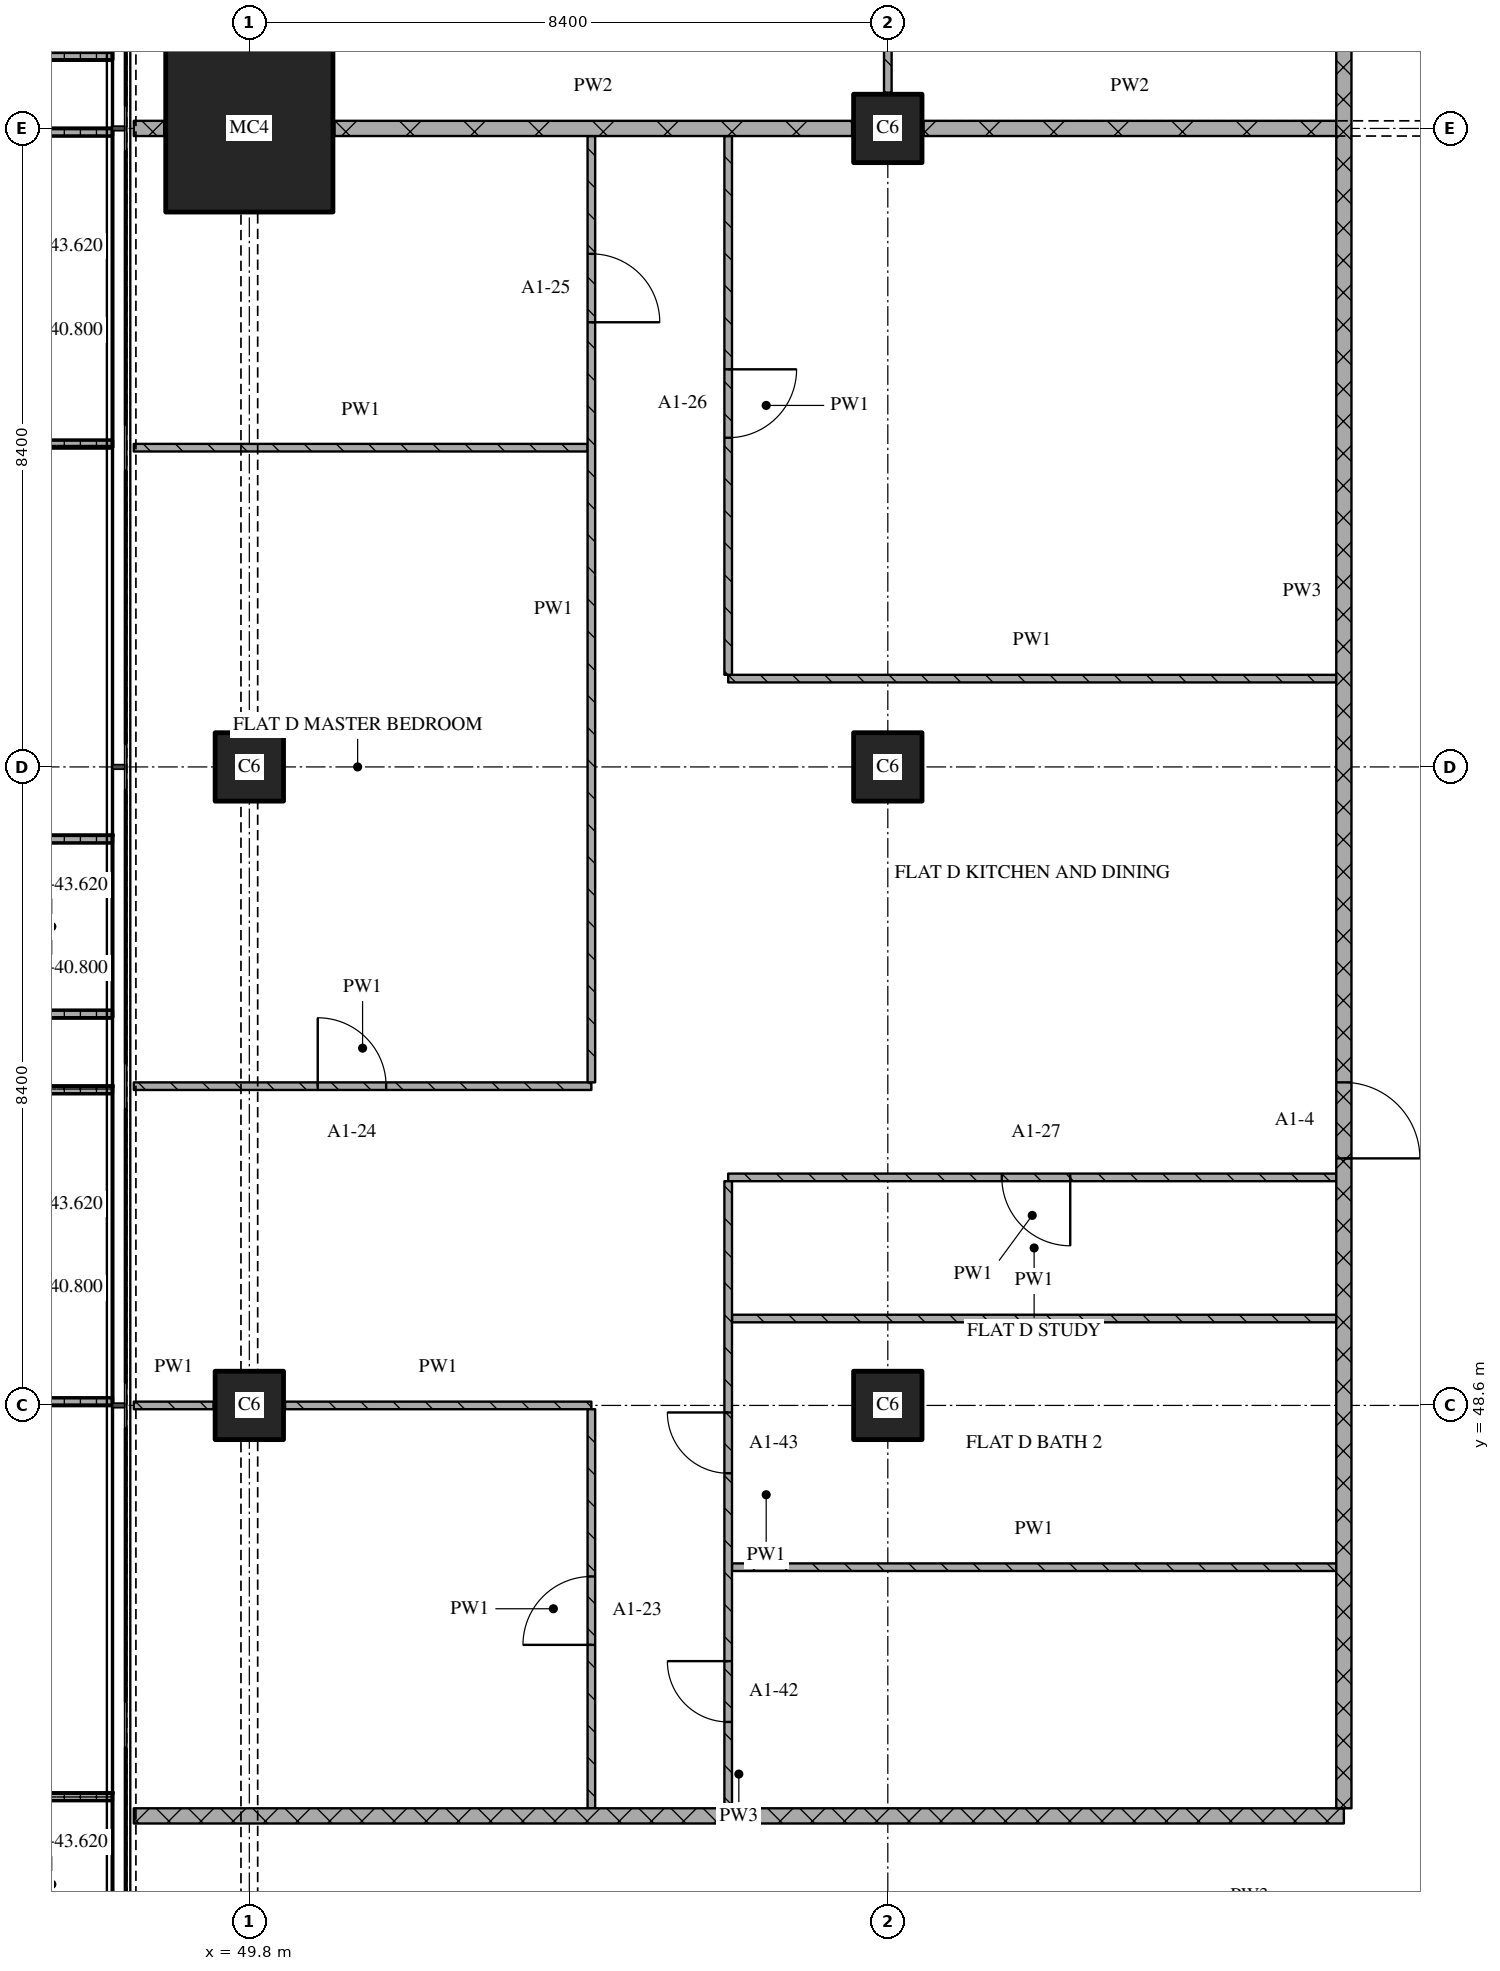
"""IFC4 building model, lengths in metres.
Left out: names, types, materials, properties, quantities, classifications, styles, units other than length and angle.
Written with IfcOpenShell. Run it as: python <this file> out.ifc"""

import sys

from ifc_helpers import new_model, si_unit, direction, frame, frame_2d, origin, origin_2d, place, context, subcontext, project, spatial, polyline, rectangle, outline, extrude, element, fill, save


model = new_model("IFC4")
c1 = context("Model", 3, precision=1e-05, world=origin(), true_north=direction((0.0, 1.0)))
c2 = subcontext(c1, "Body", "Model", "MODEL_VIEW")
j1 = project(units=[si_unit("LENGTHUNIT", "METRE"), si_unit("PLANEANGLEUNIT", "RADIAN")], contexts=[c1])
p1 = place(None, origin())
s1 = spatial("IfcSite", under=j1, at=p1, CompositionType="ELEMENT")
p2 = place(p1, origin())
s2 = spatial("IfcBuilding", under=s1, at=p2, CompositionType="ELEMENT")
p3 = place(p2, frame((0.0, 0.0, 40.8)))
s3 = spatial("IfcBuildingStorey", under=s2, at=p3, CompositionType="ELEMENT", Elevation=40.8)
for number, where, z_axis, x_axis in (
    (1, (49.8, 48.6, 0.0), (0.0, 0.0, 1.0), (1.0, 0.0, 0.0)),
    (2, (49.8, 57.0, 0.0), (0.0, 0.0, 1.0), (1.0, 0.0, 0.0)),
):
    element("IfcColumn", number, at=place(p3, frame(where, z_axis=z_axis, x_axis=x_axis)), inside=s3, PredefinedType="COLUMN", context=c2, shape_type="SweptSolid", body=[
        extrude(rectangle(XDim=0.9, YDim=0.9, at=origin_2d()), origin(), (0.0, 0.0, 1.0), 3.6),
    ])
p4 = place(p3, frame((49.8, 65.4, 0.0), z_axis=(0.0, 0.0, 1.0), x_axis=(1.0, 0.0, 0.0)))
e3 = element("IfcColumn", 3, at=p4, inside=s3, PredefinedType="COLUMN", context=c2, shape_type="SweptSolid", body=[
    extrude(rectangle(XDim=2.2, YDim=2.2, at=origin_2d()), origin(), (0.0, 0.0, 1.0), 3.6),
])
for number, where, z_axis, x_axis in (
    (4, (58.2, 48.6, 0.0), (0.0, 0.0, 1.0), (1.0, 0.0, 0.0)),
    (5, (58.2, 57.0, 0.0), (0.0, 0.0, 1.0), (1.0, 0.0, 0.0)),
    (6, (58.2, 65.4, 0.0), (0.0, 0.0, 1.0), (1.0, 0.0, 0.0)),
):
    element("IfcColumn", number, at=place(p3, frame(where, z_axis=z_axis, x_axis=x_axis)), inside=s3, PredefinedType="COLUMN", context=c2, shape_type="SweptSolid", body=[
        extrude(rectangle(XDim=0.9, YDim=0.9, at=origin_2d()), origin(), (0.0, 0.0, 1.0), 3.6),
    ])
p5 = place(p3, origin())
e7 = element("IfcWall", 7, at=p5, inside=s3, PredefinedType="SOLIDWALL", context=c2, shape_type="SweptSolid", body=[
    extrude(outline(polyline([(48.0, 68.7), (48.0, 68.6), (46.5, 68.6), (46.5, 66.4), (48.0, 66.4), (48.0, 66.3), (46.4, 66.3), (46.4, 68.7), (48.0, 68.7)])), origin(), (0.0, 0.0, 1.0), 1.0),
])
p6 = place(p3, origin())
e8 = element("IfcWall", 8, at=p6, inside=s3, PredefinedType="SOLIDWALL", context=c2, shape_type="SweptSolid", body=[
    extrude(outline(polyline([(48.0, 65.4), (48.0, 65.3), (46.367, 65.3), (46.367, 61.3), (48.0, 61.3), (48.0, 61.2), (46.267, 61.2), (46.267, 65.4), (48.0, 65.4)])), origin(), (0.0, 0.0, 1.0), 1.0),
])
p7 = place(p3, origin())
e9 = element("IfcWall", 9, at=p7, inside=s3, PredefinedType="SOLIDWALL", context=c2, shape_type="SweptSolid", body=[
    extrude(outline(polyline([(48.0, 56.1), (48.0, 56.0), (46.5, 56.0), (46.5, 53.8), (48.0, 53.8), (48.0, 53.7), (46.4, 53.7), (46.4, 56.1), (48.0, 56.1)])), origin(), (0.0, 0.0, 1.0), 1.0),
])
p8 = place(p3, origin())
e10 = element("IfcWall", 10, at=p8, inside=s3, PredefinedType="SOLIDWALL", context=c2, shape_type="SweptSolid", body=[
    extrude(outline(polyline([(48.0, 52.8), (48.0, 52.7), (46.367, 52.7), (46.367, 48.7), (48.0, 48.7), (48.0, 48.6), (46.267, 48.6), (46.267, 52.8), (48.0, 52.8)])), origin(), (0.0, 0.0, 1.0), 1.0),
])
p9 = place(p3, origin())
e11 = element("IfcWall", 11, at=p9, inside=s3, PredefinedType="SOLIDWALL", context=c2, shape_type="SweptSolid", body=[
    extrude(outline(polyline([(48.0, 43.5), (48.0, 43.4), (46.5, 43.4), (46.5, 41.2), (48.0, 41.2), (48.0, 41.1), (46.4, 41.1), (46.4, 43.5), (48.0, 43.5)])), origin(), (0.0, 0.0, 1.0), 1.0),
])
p10 = place(p3, frame((48.28, 43.2, 0.0), z_axis=(0.0, 0.0, 1.0), x_axis=(1.0, 0.0, 0.0)))
e12 = element("IfcWall", 12, at=p10, inside=s3, PredefinedType="PARTITIONING", context=c2, shape_type="SweptSolid", body=[
    extrude(rectangle(XDim=15.92, YDim=0.2, at=frame_2d((7.96, 0.0))), origin(), (0.0, 0.0, 1.0), 3.32),
])
p11 = place(p3, frame((56.15, 46.472, 0.0), z_axis=(0.0, 0.0, 1.0), x_axis=(1.0, 0.0, 0.0)))
e13 = element("IfcWall", 13, at=p11, inside=s3, PredefinedType="PARTITIONING", context=c2, shape_type="SweptSolid", body=[
    extrude(rectangle(XDim=7.95, YDim=0.1, at=frame_2d((3.975, 0.0))), origin(), (0.0, 0.0, 1.0), 3.32),
])
p12 = place(p3, frame((48.28, 48.6, 0.0), z_axis=(0.0, 0.0, 1.0), x_axis=(1.0, 0.0, 0.0)))
e14 = element("IfcWall", 14, at=p12, inside=s3, PredefinedType="PARTITIONING", context=c2, shape_type="SweptSolid", body=[
    extrude(rectangle(XDim=1.05, YDim=0.1, at=frame_2d((0.525, 0.0))), origin(), (0.0, 0.0, 1.0), 3.32),
])
p13 = place(p3, frame((50.27, 48.6, 0.0), z_axis=(0.0, 0.0, 1.0), x_axis=(1.0, 0.0, 0.0)))
e15 = element("IfcWall", 15, at=p13, inside=s3, PredefinedType="PARTITIONING", context=c2, shape_type="SweptSolid", body=[
    extrude(rectangle(XDim=4.03, YDim=0.1, at=frame_2d((2.015, 0.0))), origin(), (0.0, 0.0, 1.0), 3.32),
])
p14 = place(p3, frame((56.15, 49.743, 0.0), z_axis=(0.0, 0.0, 1.0), x_axis=(1.0, 0.0, 0.0)))
e16 = element("IfcWall", 16, at=p14, inside=s3, PredefinedType="PARTITIONING", context=c2, shape_type="SweptSolid", body=[
    extrude(rectangle(XDim=7.95, YDim=0.1, at=frame_2d((3.975, 0.0))), origin(), (0.0, 0.0, 1.0), 3.32),
])
p15 = place(p3, frame((64.1, 51.6, 0.0), z_axis=(0.0, 0.0, 1.0), x_axis=(-1.0, 0.0, 0.0)))
e17 = element("IfcWall", 17, at=p15, inside=s3, PredefinedType="PARTITIONING", context=c2, shape_type="SweptSolid", body=[
    extrude(rectangle(XDim=8.0, YDim=0.1, at=frame_2d((4.0, 0.0))), origin(), (0.0, 0.0, 1.0), 3.32),
])
p16 = place(p15, frame((3.5, 0.0, 0.0)))
e18 = element("IfcOpeningElement", 18, at=p16, cuts=e17, PredefinedType="OPENING", context=c2, shape_type="SweptSolid", body=[
    extrude(rectangle(XDim=0.9, YDim=2.1, at=frame_2d((0.45, 1.05))), frame((0.0, 0.06, 0.0), z_axis=(0.0, -1.0, 0.0), x_axis=(1.0, 0.0, 0.0)), (0.0, 0.0, 1.0), 0.12),
])
p17 = place(p3, frame((48.28, 52.8, 0.0), z_axis=(0.0, 0.0, 1.0), x_axis=(1.0, 0.0, 0.0)))
e19 = element("IfcWall", 19, at=p17, inside=s3, PredefinedType="PARTITIONING", context=c2, shape_type="SweptSolid", body=[
    extrude(rectangle(XDim=6.02, YDim=0.1, at=frame_2d((3.01, 0.0))), origin(), (0.0, 0.0, 1.0), 3.32),
])
p18 = place(p17, frame((2.42, 0.0, 0.0)))
e20 = element("IfcOpeningElement", 20, at=p18, cuts=e19, PredefinedType="OPENING", context=c2, shape_type="SweptSolid", body=[
    extrude(rectangle(XDim=0.9, YDim=2.1, at=frame_2d((0.45, 1.05))), frame((0.0, 0.06, 0.0), z_axis=(0.0, -1.0, 0.0), x_axis=(1.0, 0.0, 0.0)), (0.0, 0.0, 1.0), 0.12),
])
p19 = place(p3, frame((56.1, 58.162, 0.0), z_axis=(0.0, 0.0, 1.0), x_axis=(1.0, 0.0, 0.0)))
e21 = element("IfcWall", 21, at=p19, inside=s3, PredefinedType="PARTITIONING", context=c2, shape_type="SweptSolid", body=[
    extrude(rectangle(XDim=8.0, YDim=0.1, at=frame_2d((4.0, 0.0))), origin(), (0.0, 0.0, 1.0), 3.32),
])
p20 = place(p3, frame((48.28, 61.2, 0.0), z_axis=(0.0, 0.0, 1.0), x_axis=(1.0, 0.0, 0.0)))
e22 = element("IfcWall", 22, at=p20, inside=s3, PredefinedType="PARTITIONING", context=c2, shape_type="SweptSolid", body=[
    extrude(rectangle(XDim=5.97, YDim=0.1, at=frame_2d((2.985, 0.0))), origin(), (0.0, 0.0, 1.0), 3.32),
])
p21 = place(p3, frame((48.28, 65.4, 0.0), z_axis=(0.0, 0.0, 1.0), x_axis=(1.0, 0.0, 0.0)))
e23 = element("IfcWall", 23, at=p21, inside=s3, PredefinedType="PARTITIONING", context=c2, shape_type="SweptSolid", body=[
    extrude(rectangle(XDim=0.4, YDim=0.2, at=frame_2d((0.2, 0.0))), origin(), (0.0, 0.0, 1.0), 3.32),
])
p22 = place(p3, frame((50.92, 65.4, 0.0), z_axis=(0.0, 0.0, 1.0), x_axis=(1.0, 0.0, 0.0)))
e24 = element("IfcWall", 24, at=p22, inside=s3, PredefinedType="PARTITIONING", context=c2, shape_type="SweptSolid", body=[
    extrude(rectangle(XDim=6.81, YDim=0.2, at=frame_2d((3.405, 0.0))), origin(), (0.0, 0.0, 1.0), 3.32),
])
p23 = place(p3, frame((58.67, 65.4, 0.0), z_axis=(0.0, 0.0, 1.0), x_axis=(1.0, 0.0, 0.0)))
e25 = element("IfcWall", 25, at=p23, inside=s3, PredefinedType="PARTITIONING", context=c2, shape_type="SweptSolid", body=[
    extrude(rectangle(XDim=5.43, YDim=0.2, at=frame_2d((2.715, 0.0))), origin(), (0.0, 0.0, 1.0), 2.82),
])
p24 = place(p3, frame((54.3, 43.3, 0.0), z_axis=(0.0, 0.0, 1.0), x_axis=(0.0, 1.0, 0.0)))
e26 = element("IfcWall", 26, at=p24, inside=s3, PredefinedType="PARTITIONING", context=c2, shape_type="SweptSolid", body=[
    extrude(rectangle(XDim=5.25, YDim=0.1, at=frame_2d((2.625, 0.0))), origin(), (0.0, 0.0, 1.0), 3.32),
])
p25 = place(p24, frame((2.15, 0.0, 0.0)))
e27 = element("IfcOpeningElement", 27, at=p25, cuts=e26, PredefinedType="OPENING", context=c2, shape_type="SweptSolid", body=[
    extrude(rectangle(XDim=0.9, YDim=2.1, at=frame_2d((0.45, 1.05))), frame((0.0, 0.06, 0.0), z_axis=(0.0, -1.0, 0.0), x_axis=(1.0, 0.0, 0.0)), (0.0, 0.0, 1.0), 0.12),
])
p26 = place(p3, frame((54.3, 52.85, 0.0), z_axis=(0.0, 0.0, 1.0), x_axis=(0.0, 1.0, 0.0)))
e28 = element("IfcWall", 28, at=p26, inside=s3, PredefinedType="PARTITIONING", context=c2, shape_type="SweptSolid", body=[
    extrude(rectangle(XDim=12.45, YDim=0.1, at=frame_2d((6.225, 0.0))), origin(), (0.0, 0.0, 1.0), 3.32),
])
p27 = place(p26, frame((10.0, 0.0, 0.0)))
e29 = element("IfcOpeningElement", 29, at=p27, cuts=e28, PredefinedType="OPENING", context=c2, shape_type="SweptSolid", body=[
    extrude(rectangle(XDim=0.9, YDim=2.1, at=frame_2d((0.45, 1.05))), frame((0.0, 0.06, 0.0), z_axis=(0.0, -1.0, 0.0), x_axis=(1.0, 0.0, 0.0)), (0.0, 0.0, 1.0), 0.12),
])
p28 = place(p3, frame((56.1, 51.55, 0.0), z_axis=(0.0, 0.0, 1.0), x_axis=(0.0, -1.0, 0.0)))
e30 = element("IfcWall", 30, at=p28, inside=s3, PredefinedType="PARTITIONING", context=c2, shape_type="SweptSolid", body=[
    extrude(rectangle(XDim=8.25, YDim=0.1, at=frame_2d((4.125, 0.0))), origin(), (0.0, 0.0, 1.0), 3.32),
])
p29 = place(p28, frame((3.042, 0.0, 0.0)))
e31 = element("IfcOpeningElement", 31, at=p29, cuts=e30, PredefinedType="OPENING", context=c2, shape_type="SweptSolid", body=[
    extrude(rectangle(XDim=0.8, YDim=2.1, at=frame_2d((0.4, 1.05))), frame((0.0, 0.06, 0.0), z_axis=(0.0, -1.0, 0.0), x_axis=(1.0, 0.0, 0.0)), (0.0, 0.0, 1.0), 0.12),
])
p30 = place(p28, frame((6.314, 0.0, 0.0)))
e32 = element("IfcOpeningElement", 32, at=p30, cuts=e30, PredefinedType="OPENING", context=c2, shape_type="SweptSolid", body=[
    extrude(rectangle(XDim=0.8, YDim=2.1, at=frame_2d((0.4, 1.05))), frame((0.0, 0.06, 0.0), z_axis=(0.0, -1.0, 0.0), x_axis=(1.0, 0.0, 0.0)), (0.0, 0.0, 1.0), 0.12),
])
p31 = place(p3, frame((56.1, 65.3, 0.0), z_axis=(0.0, 0.0, 1.0), x_axis=(0.0, -1.0, 0.0)))
e33 = element("IfcWall", 33, at=p31, inside=s3, PredefinedType="PARTITIONING", context=c2, shape_type="SweptSolid", body=[
    extrude(rectangle(XDim=7.088, YDim=0.1, at=frame_2d((3.544, 0.0))), origin(), (0.0, 0.0, 1.0), 3.32),
])
p32 = place(p31, frame((3.069, 0.0, 0.0)))
e34 = element("IfcOpeningElement", 34, at=p32, cuts=e33, PredefinedType="OPENING", context=c2, shape_type="SweptSolid", body=[
    extrude(rectangle(XDim=0.9, YDim=2.1, at=frame_2d((0.45, 1.05))), frame((0.0, 0.06, 0.0), z_axis=(0.0, -1.0, 0.0), x_axis=(1.0, 0.0, 0.0)), (0.0, 0.0, 1.0), 0.12),
])
p33 = place(p3, frame((58.2, 68.95, 0.0), z_axis=(0.0, 0.0, 1.0), x_axis=(0.0, -1.0, 0.0)))
e35 = element("IfcWall", 35, at=p33, inside=s3, PredefinedType="PARTITIONING", context=c2, shape_type="SweptSolid", body=[
    extrude(rectangle(XDim=3.08, YDim=0.1, at=frame_2d((1.54, 0.0))), origin(), (0.0, 0.0, 1.0), 3.32),
])
p34 = place(p3, frame((64.2, 43.3, 0.0), z_axis=(0.0, 0.0, 1.0), x_axis=(0.0, 1.0, 0.0)))
e36 = element("IfcWall", 36, at=p34, inside=s3, PredefinedType="PARTITIONING", context=c2, shape_type="SweptSolid", body=[
    extrude(rectangle(XDim=32.02, YDim=0.2, at=frame_2d((16.01, 0.0))), origin(), (0.0, 0.0, 1.0), 3.32),
])
p35 = place(p34, frame((8.55, 0.0, 0.0)))
e37 = element("IfcOpeningElement", 37, at=p35, cuts=e36, PredefinedType="OPENING", context=c2, shape_type="SweptSolid", body=[
    extrude(rectangle(XDim=1.0, YDim=2.1, at=frame_2d((0.5, 1.05))), frame((0.0, 0.11, 0.0), z_axis=(0.0, -1.0, 0.0), x_axis=(1.0, 0.0, 0.0)), (0.0, 0.0, 1.0), 0.22),
])
p36 = place(p34, frame((25.95, 0.0, 0.0)))
e38 = element("IfcOpeningElement", 38, at=p36, cuts=e36, PredefinedType="OPENING", context=c2, shape_type="SweptSolid", body=[
    extrude(rectangle(XDim=1.0, YDim=2.1, at=frame_2d((0.5, 1.05))), frame((0.0, 0.11, 0.0), z_axis=(0.0, -1.0, 0.0), x_axis=(1.0, 0.0, 0.0)), (0.0, 0.0, 1.0), 0.22),
])
p37 = place(p16, origin())
e39 = element("IfcDoor", 39, at=p37, inside=s3, OperationType="SINGLE_SWING_LEFT", PredefinedType="DOOR", context=c2, shape_type="SweptSolid", body=[
    extrude(rectangle(XDim=0.9, YDim=2.1, at=frame_2d((0.45, 1.05))), frame((0.0, 0.025, 0.0), z_axis=(0.0, -1.0, 0.0), x_axis=(1.0, 0.0, 0.0)), (0.0, 0.0, 1.0), 0.05),
])
fill(e18, e39)
p38 = place(p18, origin())
e40 = element("IfcDoor", 40, at=p38, inside=s3, OperationType="SINGLE_SWING_LEFT", PredefinedType="DOOR", context=c2, shape_type="SweptSolid", body=[
    extrude(rectangle(XDim=0.9, YDim=2.1, at=frame_2d((0.45, 1.05))), frame((0.0, 0.025, 0.0), z_axis=(0.0, -1.0, 0.0), x_axis=(1.0, 0.0, 0.0)), (0.0, 0.0, 1.0), 0.05),
])
fill(e20, e40)
p39 = place(p25, origin())
e41 = element("IfcDoor", 41, at=p39, inside=s3, OperationType="SINGLE_SWING_LEFT", PredefinedType="DOOR", context=c2, shape_type="SweptSolid", body=[
    extrude(rectangle(XDim=0.9, YDim=2.1, at=frame_2d((0.45, 1.05))), frame((0.0, 0.025, 0.0), z_axis=(0.0, -1.0, 0.0), x_axis=(1.0, 0.0, 0.0)), (0.0, 0.0, 1.0), 0.05),
])
fill(e27, e41)
p40 = place(p27, origin())
e42 = element("IfcDoor", 42, at=p40, inside=s3, OperationType="SINGLE_SWING_RIGHT", PredefinedType="DOOR", context=c2, shape_type="SweptSolid", body=[
    extrude(rectangle(XDim=0.9, YDim=2.1, at=frame_2d((0.45, 1.05))), frame((0.0, 0.025, 0.0), z_axis=(0.0, -1.0, 0.0), x_axis=(1.0, 0.0, 0.0)), (0.0, 0.0, 1.0), 0.05),
])
fill(e29, e42)
p41 = place(p29, origin())
e43 = element("IfcDoor", 43, at=p41, inside=s3, OperationType="SINGLE_SWING_RIGHT", PredefinedType="DOOR", context=c2, shape_type="SweptSolid", body=[
    extrude(rectangle(XDim=0.8, YDim=2.1, at=frame_2d((0.4, 1.05))), frame((0.0, 0.025, 0.0), z_axis=(0.0, -1.0, 0.0), x_axis=(1.0, 0.0, 0.0)), (0.0, 0.0, 1.0), 0.05),
])
fill(e31, e43)
p42 = place(p30, origin())
e44 = element("IfcDoor", 44, at=p42, inside=s3, OperationType="SINGLE_SWING_RIGHT", PredefinedType="DOOR", context=c2, shape_type="SweptSolid", body=[
    extrude(rectangle(XDim=0.8, YDim=2.1, at=frame_2d((0.4, 1.05))), frame((0.0, 0.025, 0.0), z_axis=(0.0, -1.0, 0.0), x_axis=(1.0, 0.0, 0.0)), (0.0, 0.0, 1.0), 0.05),
])
fill(e32, e44)
p43 = place(p32, origin())
e45 = element("IfcDoor", 45, at=p43, inside=s3, OperationType="SINGLE_SWING_LEFT", PredefinedType="DOOR", context=c2, shape_type="SweptSolid", body=[
    extrude(rectangle(XDim=0.9, YDim=2.1, at=frame_2d((0.45, 1.05))), frame((0.0, 0.025, 0.0), z_axis=(0.0, -1.0, 0.0), x_axis=(1.0, 0.0, 0.0)), (0.0, 0.0, 1.0), 0.05),
])
fill(e34, e45)
p44 = place(p35, origin())
e46 = element("IfcDoor", 46, at=p44, inside=s3, OperationType="SINGLE_SWING_RIGHT", PredefinedType="DOOR", context=c2, shape_type="SweptSolid", body=[
    extrude(rectangle(XDim=1.0, YDim=2.1, at=frame_2d((0.5, 1.05))), frame((0.0, 0.025, 0.0), z_axis=(0.0, -1.0, 0.0), x_axis=(1.0, 0.0, 0.0)), (0.0, 0.0, 1.0), 0.05),
])
fill(e37, e46)
save(model, sys.argv[1])
